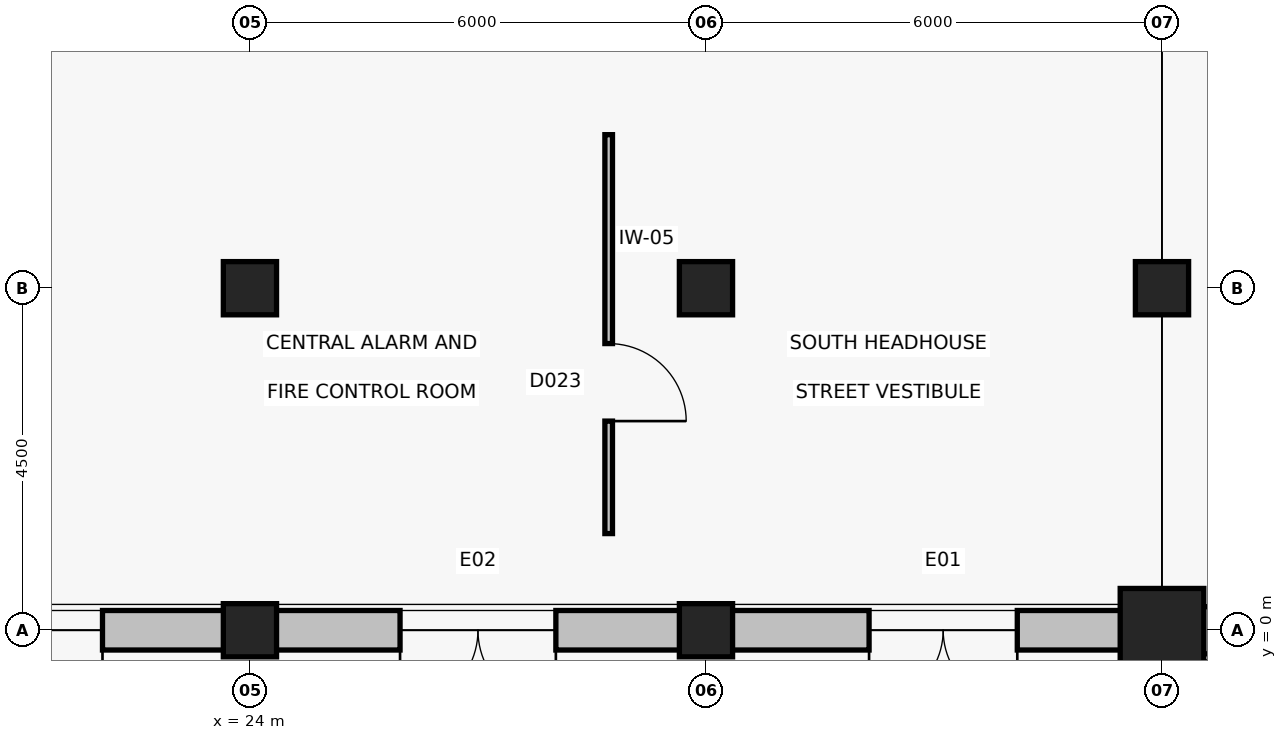
"""IFC4 building model, lengths in metres.
Left out: names, types, materials, properties, quantities, classifications, styles, units other than length and angle.
Written with IfcOpenShell. Run it as: python <this file> out.ifc"""

import sys

from ifc_helpers import new_model, si_unit, direction, frame, frame_2d, origin, origin_2d, place, context, subcontext, project, spatial, rectangle, circle, extrude, element, fill, save


model = new_model("IFC4")
c1 = context("Model", 3, precision=1e-05, world=origin(), true_north=direction((0.0, 1.0)))
c2 = subcontext(c1, "Body", "Model", "MODEL_VIEW")
j1 = project(units=[si_unit("LENGTHUNIT", "METRE"), si_unit("PLANEANGLEUNIT", "RADIAN")], contexts=[c1])
p1 = place(None, origin())
s1 = spatial("IfcSite", under=j1, at=p1, CompositionType="ELEMENT")
p2 = place(p1, origin())
s2 = spatial("IfcBuilding", under=s1, at=p2, CompositionType="ELEMENT")
p3 = place(p2, origin())
s3 = spatial("IfcBuildingStorey", under=s2, at=p3, CompositionType="ELEMENT", Elevation=0.0)
for number, where, z_axis, x_axis in (
    (1, (24.0, 0.0, 0.0), (0.0, 0.0, 1.0), (1.0, 0.0, 0.0)),
    (2, (24.0, 4.5, 0.0), (0.0, 0.0, 1.0), (1.0, 0.0, 0.0)),
    (3, (30.0, 0.0, 0.0), (0.0, 0.0, 1.0), (1.0, 0.0, 0.0)),
    (4, (30.0, 4.5, 0.0), (0.0, 0.0, 1.0), (1.0, 0.0, 0.0)),
):
    element("IfcColumn", number, at=place(p3, frame(where, z_axis=z_axis, x_axis=x_axis)), inside=s3, PredefinedType="COLUMN", context=c2, shape_type="SweptSolid", body=[
        extrude(rectangle(XDim=0.7, YDim=0.7, at=origin_2d()), origin(), (0.0, 0.0, 1.0), 6.6),
    ])
p4 = place(p3, frame((36.0, 0.0, 0.0), z_axis=(0.0, 0.0, 1.0), x_axis=(1.0, 0.0, 0.0)))
e5 = element("IfcColumn", 5, at=p4, inside=s3, PredefinedType="COLUMN", context=c2, shape_type="SweptSolid", body=[
    extrude(circle(Radius=0.55, at=origin_2d()), origin(), (0.0, 0.0, 1.0), 6.6),
])
p5 = place(p3, frame((36.0, 4.5, 0.0), z_axis=(0.0, 0.0, 1.0), x_axis=(1.0, 0.0, 0.0)))
e6 = element("IfcColumn", 6, at=p5, inside=s3, PredefinedType="COLUMN", context=c2, shape_type="SweptSolid", body=[
    extrude(rectangle(XDim=0.7, YDim=0.7, at=origin_2d()), origin(), (0.0, 0.0, 1.0), 6.6),
])
p6 = place(p3, frame((36.25, 0.0, 0.0), z_axis=(0.0, 0.0, 1.0), x_axis=(-1.0, 0.0, 0.0)))
e7 = element("IfcWall", 7, at=p6, inside=s3, PredefinedType="SOLIDWALL", context=c2, shape_type="SweptSolid", body=[
    extrude(rectangle(XDim=6.258, YDim=0.52, at=frame_2d((3.129, 0.0))), origin(), (0.0, 0.0, 1.0), 3.953),
])
p7 = place(p6, frame((2.154, 0.0, 0.0)))
e8 = element("IfcOpeningElement", 8, at=p7, cuts=e7, PredefinedType="OPENING", context=c2, shape_type="SweptSolid", body=[
    extrude(rectangle(XDim=1.95, YDim=2.4, at=frame_2d((0.975, 1.2))), frame((0.0, 0.275, 0.0), z_axis=(0.0, -1.0, 0.0), x_axis=(1.0, 0.0, 0.0)), (0.0, 0.0, 1.0), 0.55),
])
p8 = place(p3, frame((30.008, 0.0, 0.0), z_axis=(0.0, 0.0, 1.0), x_axis=(-1.0, 0.0, 0.0)))
e9 = element("IfcWall", 9, at=p8, inside=s3, PredefinedType="SOLIDWALL", context=c2, shape_type="SweptSolid", body=[
    extrude(rectangle(XDim=6.016, YDim=0.52, at=frame_2d((3.008, 0.0))), origin(), (0.0, 0.0, 1.0), 5.837),
])
p9 = place(p8, frame((1.983, 0.0, 0.0)))
e10 = element("IfcOpeningElement", 10, at=p9, cuts=e9, PredefinedType="OPENING", context=c2, shape_type="SweptSolid", body=[
    extrude(rectangle(XDim=2.05, YDim=2.45, at=frame_2d((1.025, 1.225))), frame((0.0, 0.275, 0.0), z_axis=(0.0, -1.0, 0.0), x_axis=(1.0, 0.0, 0.0)), (0.0, 0.0, 1.0), 0.55),
])
p10 = place(p3, frame((24.008, 0.0, 0.0), z_axis=(0.0, 0.0, 1.0), x_axis=(-1.0, 0.0, 0.0)))
e11 = element("IfcWall", 11, at=p10, inside=s3, PredefinedType="SOLIDWALL", context=c2, shape_type="SweptSolid", body=[
    extrude(rectangle(XDim=6.016, YDim=0.52, at=frame_2d((3.008, 0.0))), origin(), (0.0, 0.0, 1.0), 5.761),
])
p11 = place(p10, frame((1.948, 0.0, 0.0)))
e12 = element("IfcOpeningElement", 12, at=p11, cuts=e11, PredefinedType="OPENING", context=c2, shape_type="SweptSolid", body=[
    extrude(rectangle(XDim=2.12, YDim=2.5, at=frame_2d((1.06, 1.25))), frame((0.0, 0.275, 0.0), z_axis=(0.0, -1.0, 0.0), x_axis=(1.0, 0.0, 0.0)), (0.0, 0.0, 1.0), 0.55),
])
p12 = place(p3, frame((35.75, 0.0, 0.0), z_axis=(0.0, 0.0, 1.0), x_axis=(1.0, 0.0, 0.0)))
e13 = element("IfcWall", 13, at=p12, inside=s3, PredefinedType="SOLIDWALL", context=c2, shape_type="SweptSolid", body=[
    extrude(rectangle(XDim=8.258, YDim=0.62, at=frame_2d((4.129, 0.0))), origin(), (0.0, 0.0, 1.0), 3.953),
])
p13 = place(p12, frame((2.959, 0.0, 0.0)))
e14 = element("IfcOpeningElement", 14, at=p13, cuts=e13, PredefinedType="OPENING", context=c2, shape_type="SweptSolid", body=[
    extrude(rectangle(XDim=2.34, YDim=2.75, at=frame_2d((1.17, 1.375))), frame((0.0, 0.325, 0.0), z_axis=(0.0, -1.0, 0.0), x_axis=(1.0, 0.0, 0.0)), (0.0, 0.0, 1.0), 0.65),
])
p14 = place(p3, frame((28.72, 6.52, 0.0), z_axis=(0.0, 0.0, 1.0), x_axis=(0.0, -1.0, 0.0)))
e15 = element("IfcWall", 15, at=p14, inside=s3, PredefinedType="PARTITIONING", context=c2, shape_type="SweptSolid", body=[
    extrude(rectangle(XDim=5.248, YDim=0.1, at=frame_2d((2.624, 0.0))), origin(), (0.0, 0.0, 1.0), 5.837),
])
p15 = place(p14, frame((2.748, 0.0, 0.0)))
e16 = element("IfcOpeningElement", 16, at=p15, cuts=e15, PredefinedType="OPENING", context=c2, shape_type="SweptSolid", body=[
    extrude(rectangle(XDim=1.02, YDim=2.1, at=frame_2d((0.51, 1.05))), frame((0.0, 0.065, 0.0), z_axis=(0.0, -1.0, 0.0), x_axis=(1.0, 0.0, 0.0)), (0.0, 0.0, 1.0), 0.13),
])
p16 = place(p7, origin())
e17 = element("IfcDoor", 17, at=p16, inside=s3, OperationType="DOUBLE_DOOR_SINGLE_SWING", PredefinedType="DOOR", context=c2, shape_type="SweptSolid", body=[
    extrude(rectangle(XDim=1.95, YDim=2.4, at=frame_2d((0.975, 1.2))), frame((0.0, 0.025, 0.0), z_axis=(0.0, -1.0, 0.0), x_axis=(1.0, 0.0, 0.0)), (0.0, 0.0, 1.0), 0.05),
])
fill(e8, e17)
p17 = place(p9, origin())
e18 = element("IfcDoor", 18, at=p17, inside=s3, OperationType="DOUBLE_DOOR_SINGLE_SWING", PredefinedType="DOOR", context=c2, shape_type="SweptSolid", body=[
    extrude(rectangle(XDim=2.05, YDim=2.45, at=frame_2d((1.025, 1.225))), frame((0.0, 0.025, 0.0), z_axis=(0.0, -1.0, 0.0), x_axis=(1.0, 0.0, 0.0)), (0.0, 0.0, 1.0), 0.05),
])
fill(e10, e18)
p18 = place(p11, origin())
e19 = element("IfcDoor", 19, at=p18, inside=s3, OperationType="DOUBLE_DOOR_SINGLE_SWING", PredefinedType="DOOR", context=c2, shape_type="SweptSolid", body=[
    extrude(rectangle(XDim=2.12, YDim=2.5, at=frame_2d((1.06, 1.25))), frame((0.0, 0.025, 0.0), z_axis=(0.0, -1.0, 0.0), x_axis=(1.0, 0.0, 0.0)), (0.0, 0.0, 1.0), 0.05),
])
fill(e12, e19)
p19 = place(p15, origin())
e20 = element("IfcDoor", 20, at=p19, inside=s3, OperationType="SINGLE_SWING_RIGHT", PredefinedType="DOOR", context=c2, shape_type="SweptSolid", body=[
    extrude(rectangle(XDim=1.02, YDim=2.1, at=frame_2d((0.51, 1.05))), frame((0.0, 0.025, 0.0), z_axis=(0.0, -1.0, 0.0), x_axis=(1.0, 0.0, 0.0)), (0.0, 0.0, 1.0), 0.05),
])
fill(e16, e20)
save(model, sys.argv[1])
